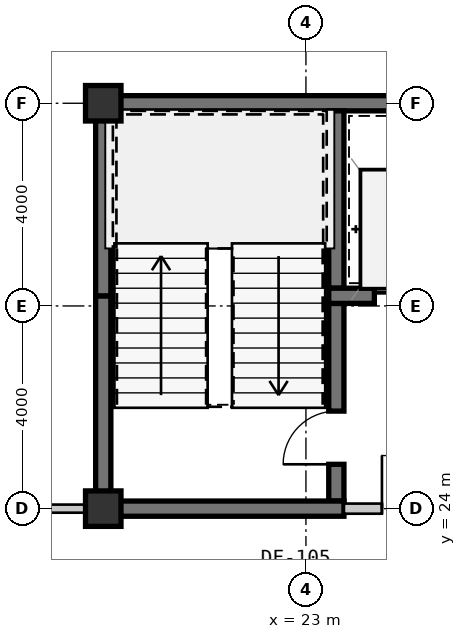
"""IFC4 building model, lengths in metres.
Left out: names, types, materials, properties, quantities, classifications, styles, units other than length and angle.
Written with IfcOpenShell. Run it as: python <this file> out.ifc"""

import sys

from ifc_helpers import new_model, si_unit, direction, frame, frame_2d, origin, origin_2d, place, context, subcontext, project, spatial, rectangle, extrude, source, transform, mapped, element, fill, save


model = new_model("IFC4")
c1 = context("Model", 3, precision=1e-05, world=origin(), true_north=direction((0.0, 1.0)))
c2 = subcontext(c1, "Body", "Model", "MODEL_VIEW")
j1 = project(units=[si_unit("LENGTHUNIT", "METRE"), si_unit("PLANEANGLEUNIT", "RADIAN")], contexts=[c1])
p1 = place(None, origin())
s1 = spatial("IfcSite", under=j1, at=p1, CompositionType="ELEMENT")
p2 = place(p1, origin())
s2 = spatial("IfcBuilding", under=s1, at=p2, CompositionType="ELEMENT")
p3 = place(p2, frame((0.0, 0.0, 99.75)))
s3 = spatial("IfcBuildingStorey", under=s2, at=p3, CompositionType="ELEMENT", Elevation=99.75)
m1 = source(origin(), c2, "Body", "SweptSolid", [
    extrude(rectangle(XDim=0.7, YDim=0.7, at=origin_2d()), origin(), (0.0, 0.0, 1.0), 3.15),
])
for number, where, z_axis, x_axis in (
    (1, (19.0, 24.0, 0.0), (0.0, 0.0, 1.0), (1.0, 0.0, 0.0)),
    (2, (19.0, 32.0, 0.0), (0.0, 0.0, 1.0), (1.0, 0.0, 0.0)),
):
    element("IfcColumn", number, at=place(p3, frame(where, z_axis=z_axis, x_axis=x_axis)), inside=s3, PredefinedType="COLUMN", context=c2, shape_type="MappedRepresentation", body=[
        mapped(m1, transform((0.0, 0.0, 0.0), scale=1.0)),
    ])
m2 = source(origin(), c2, "Body", "SweptSolid", [
    extrude(rectangle(XDim=9.15, YDim=0.3, at=frame_2d((4.575, 0.0))), origin(), (0.0, 0.0, 1.0), 2.93),
])
p4 = place(p3, frame((18.85, 32.0, 0.0), z_axis=(0.0, 0.0, 1.0), x_axis=(1.0, 0.0, 0.0)))
e3 = element("IfcWall", 3, at=p4, inside=s3, PredefinedType="SHEAR", context=c2, shape_type="MappedRepresentation", body=[
    mapped(m2, transform((0.0, 0.0, 0.0), scale=1.0)),
])
m3 = source(origin(), c2, "Body", "SweptSolid", [
    extrude(rectangle(XDim=4.05, YDim=0.3, at=frame_2d((2.025, 0.0))), origin(), (0.0, 0.0, 1.0), 2.93),
])
p5 = place(p3, frame((19.0, 24.15, 0.0), z_axis=(0.0, 0.0, 1.0), x_axis=(0.0, 1.0, 0.0)))
e4 = element("IfcWall", 4, at=p5, inside=s3, PredefinedType="SHEAR", context=c2, shape_type="MappedRepresentation", body=[
    mapped(m3, transform((0.0, 0.0, 0.0), scale=1.0)),
])
m4 = source(origin(), c2, "Body", "SweptSolid", [
    extrude(rectangle(XDim=3.65, YDim=0.3, at=frame_2d((1.825, 0.0))), origin(), (0.0, 0.0, 1.0), 2.93),
])
p6 = place(p3, frame((19.0, 28.2, 0.0), z_axis=(0.0, 0.0, 1.0), x_axis=(0.0, 1.0, 0.0)))
e5 = element("IfcWall", 5, at=p6, inside=s3, PredefinedType="SHEAR", context=c2, shape_type="MappedRepresentation", body=[
    mapped(m4, transform((0.0, 0.0, 0.0), scale=1.0)),
])
m5 = source(origin(), c2, "Body", "SweptSolid", [
    extrude(rectangle(XDim=3.5, YDim=0.3, at=frame_2d((1.75, 0.0))), origin(), (0.0, 0.0, 1.0), 2.93),
])
p7 = place(p3, frame((23.6, 28.35, 0.0), z_axis=(0.0, 0.0, 1.0), x_axis=(0.0, 1.0, 0.0)))
e6 = element("IfcWall", 6, at=p7, inside=s3, PredefinedType="SHEAR", context=c2, shape_type="MappedRepresentation", body=[
    mapped(m5, transform((0.0, 0.0, 0.0), scale=1.0)),
])
m6 = source(origin(), c2, "Body", "SweptSolid", [
    extrude(rectangle(XDim=3.9, YDim=0.3, at=frame_2d((1.95, 0.0))), origin(), (0.0, 0.0, 1.0), 2.93),
])
p8 = place(p3, frame((23.6, 24.15, 0.0), z_axis=(0.0, 0.0, 1.0), x_axis=(0.0, 1.0, 0.0)))
e7 = element("IfcWall", 7, at=p8, inside=s3, PredefinedType="SHEAR", context=c2, shape_type="MappedRepresentation", body=[
    mapped(m6, transform((0.0, 0.0, 0.0), scale=1.0)),
])
m7 = source(origin(), c2, "Body", "SweptSolid", [
    extrude(rectangle(XDim=1.05, YDim=2.1, at=frame_2d((0.525, 1.05))), frame((0.0, 0.16, 0.0), z_axis=(0.0, -1.0, 0.0), x_axis=(1.0, 0.0, 0.0)), (0.0, 0.0, 1.0), 0.32),
])
p9 = place(p8, frame((0.725, 0.0, 0.0)))
e8 = element("IfcOpeningElement", 8, at=p9, cuts=e7, PredefinedType="OPENING", context=c2, shape_type="MappedRepresentation", body=[
    mapped(m7, transform((0.0, 0.0, 0.0), scale=1.0)),
])
m8 = source(origin(), c2, "Body", "SweptSolid", [
    extrude(rectangle(XDim=4.9, YDim=0.3, at=frame_2d((2.45, 0.0))), origin(), (0.0, 0.0, 1.0), 2.93),
])
p10 = place(p3, frame((18.85, 24.0, 0.0), z_axis=(0.0, 0.0, 1.0), x_axis=(1.0, 0.0, 0.0)))
e9 = element("IfcWall", 9, at=p10, inside=s3, PredefinedType="SHEAR", context=c2, shape_type="MappedRepresentation", body=[
    mapped(m8, transform((0.0, 0.0, 0.0), scale=1.0)),
])
m9 = source(origin(), c2, "Body", "SweptSolid", [
    extrude(rectangle(XDim=2.9, YDim=0.3, at=frame_2d((1.45, 0.0))), origin(), (0.0, 0.0, 1.0), 2.93),
])
p11 = place(p3, frame((23.45, 28.2, 0.0), z_axis=(0.0, 0.0, 1.0), x_axis=(1.0, 0.0, 0.0)))
e10 = element("IfcWall", 10, at=p11, inside=s3, PredefinedType="SHEAR", context=c2, shape_type="MappedRepresentation", body=[
    mapped(m9, transform((0.0, 0.0, 0.0), scale=1.0)),
])
m10 = source(origin(), c2, "Body", "SweptSolid", [
    extrude(rectangle(XDim=1.1, YDim=2.15, at=frame_2d((0.55, 1.075))), frame((0.0, 0.16, 0.0), z_axis=(0.0, -1.0, 0.0), x_axis=(1.0, 0.0, 0.0)), (0.0, 0.0, 1.0), 0.32),
])
p12 = place(p11, frame((0.9, 0.0, 0.0)))
e11 = element("IfcOpeningElement", 11, at=p12, cuts=e10, PredefinedType="OPENING", context=c2, shape_type="MappedRepresentation", body=[
    mapped(m10, transform((0.0, 0.0, 0.0), scale=1.0)),
])
m11 = source(origin(), c2, "Body", "SweptSolid", [
    extrude(rectangle(XDim=2.7, YDim=0.2, at=frame_2d((1.35, 0.0))), origin(), (0.0, 0.0, 1.0), 2.47),
])
p13 = place(p3, frame((23.75, 24.0, 0.0), z_axis=(0.0, 0.0, 1.0), x_axis=(1.0, 0.0, 0.0)))
e12 = element("IfcWall", 12, at=p13, inside=s3, PredefinedType="SOLIDWALL", context=c2, shape_type="MappedRepresentation", body=[
    mapped(m11, transform((0.0, 0.0, 0.0), scale=1.0)),
])
m12 = source(origin(), c2, "Body", "SweptSolid", [
    extrude(rectangle(XDim=1.05, YDim=2.1, at=frame_2d((0.525, 1.05))), frame((0.0, 0.11, 0.0), z_axis=(0.0, -1.0, 0.0), x_axis=(1.0, 0.0, 0.0)), (0.0, 0.0, 1.0), 0.22),
])
p14 = place(p13, frame((0.75, 0.0, 0.0)))
e13 = element("IfcOpeningElement", 13, at=p14, cuts=e12, PredefinedType="OPENING", context=c2, shape_type="MappedRepresentation", body=[
    mapped(m12, transform((0.0, 0.0, 0.0), scale=1.0)),
])
m13 = source(origin(), c2, "Body", "SweptSolid", [
    extrude(rectangle(XDim=4.17, YDim=0.16, at=frame_2d((2.085, 0.0))), origin(), (0.0, 0.0, 1.0), 2.93),
])
p15 = place(p3, frame((14.68, 24.0, 0.0), z_axis=(0.0, 0.0, 1.0), x_axis=(1.0, 0.0, 0.0)))
e14 = element("IfcWall", 14, at=p15, inside=s3, PredefinedType="PARTITIONING", context=c2, shape_type="MappedRepresentation", body=[
    mapped(m13, transform((0.0, 0.0, 0.0), scale=1.0)),
])
m14 = source(origin(), c2, "Body", "SweptSolid", [
    extrude(rectangle(XDim=0.92, YDim=2.1, at=frame_2d((0.46, 1.05))), frame((0.0, 0.09, 0.0), z_axis=(0.0, -1.0, 0.0), x_axis=(1.0, 0.0, 0.0)), (0.0, 0.0, 1.0), 0.18),
])
p16 = place(p15, frame((1.69, 0.0, 0.0)))
e15 = element("IfcOpeningElement", 15, at=p16, cuts=e14, PredefinedType="OPENING", context=c2, shape_type="MappedRepresentation", body=[
    mapped(m14, transform((0.0, 0.0, 0.0), scale=1.0)),
])
m15 = source(origin(), c2, "Body", "SweptSolid", [
    extrude(rectangle(XDim=1.05, YDim=2.1, at=frame_2d((0.525, 1.05))), frame((0.0, 0.025, 0.0), z_axis=(0.0, -1.0, 0.0), x_axis=(1.0, 0.0, 0.0)), (0.0, 0.0, 1.0), 0.05),
])
p17 = place(p9, origin())
e16 = element("IfcDoor", 16, at=p17, inside=s3, OperationType="SINGLE_SWING_LEFT", PredefinedType="DOOR", context=c2, shape_type="MappedRepresentation", body=[
    mapped(m15, transform((0.0, 0.0, 0.0), scale=1.0)),
])
fill(e8, e16)
m16 = source(origin(), c2, "Body", "SweptSolid", [
    extrude(rectangle(XDim=1.1, YDim=2.15, at=frame_2d((0.55, 1.075))), frame((0.0, 0.025, 0.0), z_axis=(0.0, -1.0, 0.0), x_axis=(1.0, 0.0, 0.0)), (0.0, 0.0, 1.0), 0.05),
])
p18 = place(p12, origin())
e17 = element("IfcDoor", 17, at=p18, inside=s3, OperationType="SLIDING_TO_LEFT", PredefinedType="DOOR", context=c2, shape_type="MappedRepresentation", body=[
    mapped(m16, transform((0.0, 0.0, 0.0), scale=1.0)),
])
fill(e11, e17)
p19 = place(p14, origin())
e18 = element("IfcDoor", 18, at=p19, inside=s3, OperationType="SINGLE_SWING_LEFT", PredefinedType="DOOR", context=c2, shape_type="MappedRepresentation", body=[
    mapped(m15, transform((0.0, 0.0, 0.0), scale=1.0)),
])
fill(e13, e18)
save(model, sys.argv[1])
